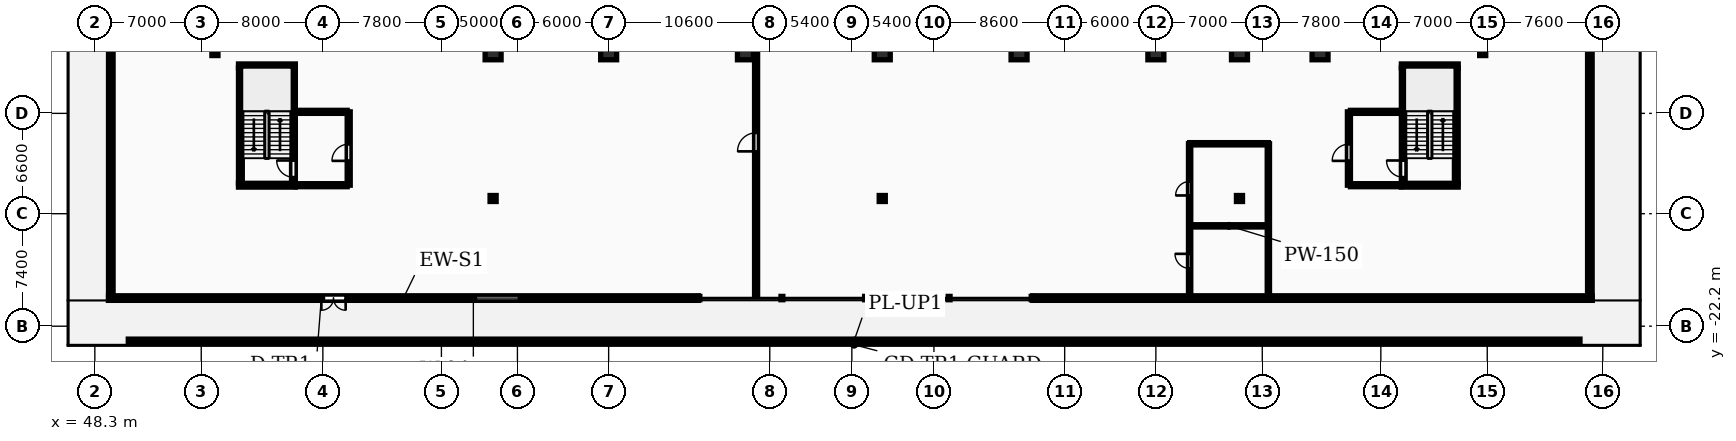
"""IFC4 building model, lengths in metres.
Left out: names, types, materials, properties, quantities, classifications, styles, units other than length and angle.
Written with IfcOpenShell. Run it as: python <this file> out.ifc"""

import sys

from ifc_helpers import new_model, si_unit, direction, frame, frame_2d, origin, origin_2d, place, context, subcontext, project, spatial, rectangle, i_section, extrude, element, fill, save


model = new_model("IFC4")
c1 = context("Model", 3, precision=1e-05, world=origin(), true_north=direction((0.0, 1.0)))
c2 = subcontext(c1, "Body", "Model", "MODEL_VIEW")
j1 = project(units=[si_unit("LENGTHUNIT", "METRE"), si_unit("PLANEANGLEUNIT", "RADIAN")], contexts=[c1])
p1 = place(None, origin())
s1 = spatial("IfcSite", under=j1, at=p1, CompositionType="ELEMENT")
p2 = place(p1, origin())
s2 = spatial("IfcBuilding", under=s1, at=p2, CompositionType="ELEMENT")
p3 = place(p2, frame((0.0, 0.0, 10.0)))
s3 = spatial("IfcBuildingStorey", under=s2, at=p3, CompositionType="ELEMENT", Elevation=10.0)
for number, where, z_axis, x_axis in (
    (1, (74.5, -4.2, 0.0), (0.0, 0.0, 1.0), (1.0, 0.0, 0.0)),
    (2, (82.1, -4.2, 0.0), (0.0, 0.0, 1.0), (1.0, 0.0, 0.0)),
    (3, (91.1, -4.2, 0.0), (0.0, 0.0, 1.0), (1.0, 0.0, 0.0)),
    (4, (100.1, -4.2, 0.0), (0.0, 0.0, 1.0), (1.0, 0.0, 0.0)),
    (5, (109.1, -4.2, 0.0), (0.0, 0.0, 1.0), (1.0, 0.0, 0.0)),
    (6, (118.1, -4.2, 0.0), (0.0, 0.0, 1.0), (1.0, 0.0, 0.0)),
    (7, (123.6, -4.2, 0.0), (0.0, 0.0, 1.0), (1.0, 0.0, 0.0)),
    (8, (128.9, -4.2, 0.0), (0.0, 0.0, 1.0), (1.0, 0.0, 0.0)),
):
    element("IfcColumn", number, at=place(p3, frame(where, z_axis=z_axis, x_axis=x_axis)), inside=s3, PredefinedType="COLUMN", context=c2, shape_type="SweptSolid", body=[
        extrude(rectangle(XDim=1.05, YDim=0.95, at=origin_2d()), origin(), (0.0, 0.0, 1.0), 4.5),
    ])
for number, where, z_axis, x_axis in (
    (9, (56.2, -4.2, 0.0), (0.0, 0.0, 1.0), (1.0, 0.0, 0.0)),
    (10, (139.6, -4.2, 0.0), (0.0, 0.0, 1.0), (1.0, 0.0, 0.0)),
    (11, (74.5, -13.8, 0.0), (0.0, 0.0, 1.0), (1.0, 0.0, 0.0)),
    (12, (100.1, -13.8, 0.0), (0.0, 0.0, 1.0), (1.0, 0.0, 0.0)),
    (13, (123.6, -13.8, 0.0), (0.0, 0.0, 1.0), (1.0, 0.0, 0.0)),
):
    element("IfcColumn", number, at=place(p3, frame(where, z_axis=z_axis, x_axis=x_axis)), inside=s3, PredefinedType="COLUMN", context=c2, shape_type="SweptSolid", body=[
        extrude(i_section(OverallWidth=0.399, OverallDepth=0.394, WebThickness=0.023, FlangeThickness=0.037, FilletRadius=0.015, at=origin_2d()), origin(), (0.0, 0.0, 1.0), 4.5),
    ])
p4 = place(p3, frame((49.2, -20.35, 0.0), z_axis=(0.0, 0.0, 1.0), x_axis=(1.0, 0.0, 0.0)))
e14 = element("IfcWall", 14, at=p4, inside=s3, PredefinedType="STANDARD", context=c2, shape_type="SweptSolid", body=[
    extrude(rectangle(XDim=38.8, YDim=0.3, at=frame_2d((19.4, 0.0))), origin(), (0.0, 0.0, 1.0), 4.2),
])
p5 = place(p4, frame((14.0, 0.0, 0.0)))
e15 = element("IfcOpeningElement", 15, at=p5, cuts=e14, PredefinedType="OPENING", context=c2, shape_type="SweptSolid", body=[
    extrude(rectangle(XDim=1.6, YDim=2.2, at=frame_2d((0.8, 1.1))), frame((0.0, 0.16, 0.0), z_axis=(0.0, -1.0, 0.0), x_axis=(1.0, 0.0, 0.0)), (0.0, 0.0, 1.0), 0.32),
])
p6 = place(p4, frame((24.0, 0.0, 0.9)))
e16 = element("IfcOpeningElement", 16, at=p6, cuts=e14, PredefinedType="OPENING", context=c2, shape_type="SweptSolid", body=[
    extrude(rectangle(XDim=3.0, YDim=2.6, at=frame_2d((1.5, 1.3))), frame((0.0, 0.16, 0.0), z_axis=(0.0, -1.0, 0.0), x_axis=(1.0, 0.0, 0.0)), (0.0, 0.0, 1.0), 0.32),
])
p7 = place(p3, frame((110.0, -20.35, 0.0), z_axis=(0.0, 0.0, 1.0), x_axis=(1.0, 0.0, 0.0)))
e17 = element("IfcWall", 17, at=p7, inside=s3, PredefinedType="STANDARD", context=c2, shape_type="SweptSolid", body=[
    extrude(rectangle(XDim=36.8, YDim=0.3, at=frame_2d((18.4, 0.0))), origin(), (0.0, 0.0, 1.0), 4.2),
])
p8 = place(p3, frame((49.35, 104.2, 0.0), z_axis=(0.0, 0.0, 1.0), x_axis=(0.0, -1.0, 0.0)))
e18 = element("IfcWall", 18, at=p8, inside=s3, PredefinedType="STANDARD", context=c2, shape_type="SweptSolid", body=[
    extrude(rectangle(XDim=124.7, YDim=0.3, at=frame_2d((62.35, 0.0))), origin(), (0.0, 0.0, 1.0), 4.2),
])
p9 = place(p8, frame((12.0, 0.0, 0.0)))
e19 = element("IfcOpeningElement", 19, at=p9, cuts=e18, PredefinedType="OPENING", context=c2, shape_type="SweptSolid", body=[
    extrude(rectangle(XDim=1.6, YDim=2.2, at=frame_2d((0.8, 1.1))), frame((0.0, 0.16, 0.0), z_axis=(0.0, -1.0, 0.0), x_axis=(1.0, 0.0, 0.0)), (0.0, 0.0, 1.0), 0.32),
])
p10 = place(p3, frame((146.65, -20.5, 0.0), z_axis=(0.0, 0.0, 1.0), x_axis=(0.0, 1.0, 0.0)))
e20 = element("IfcWall", 20, at=p10, inside=s3, PredefinedType="STANDARD", context=c2, shape_type="SweptSolid", body=[
    extrude(rectangle(XDim=124.7, YDim=0.3, at=frame_2d((62.35, 0.0))), origin(), (0.0, 0.0, 1.0), 4.2),
])
p11 = place(p10, frame((20.0, 0.0, 0.0)))
e21 = element("IfcOpeningElement", 21, at=p11, cuts=e20, PredefinedType="OPENING", context=c2, shape_type="SweptSolid", body=[
    extrude(rectangle(XDim=1.6, YDim=2.2, at=frame_2d((0.8, 1.1))), frame((0.0, 0.16, 0.0), z_axis=(0.0, -1.0, 0.0), x_axis=(1.0, 0.0, 0.0)), (0.0, 0.0, 1.0), 0.32),
])
p12 = place(p3, frame((50.5, -23.15, 0.0), z_axis=(0.0, 0.0, 1.0), x_axis=(1.0, 0.0, 0.0)))
e22 = element("IfcWall", 22, at=p12, inside=s3, PredefinedType="PARAPET", context=c2, shape_type="SweptSolid", body=[
    extrude(rectangle(XDim=95.5, YDim=0.2, at=frame_2d((47.75, 0.0))), origin(), (0.0, 0.0, 1.0), 0.65),
])
p13 = place(p3, frame((57.875, -12.8, 0.0), z_axis=(0.0, 0.0, 1.0), x_axis=(0.0, 1.0, 0.0)))
e23 = element("IfcWall", 23, at=p13, inside=s3, PredefinedType="SHEAR", context=c2, shape_type="SweptSolid", body=[
    extrude(rectangle(XDim=7.6, YDim=0.25, at=frame_2d((3.8, 0.0))), origin(), (0.0, 0.0, 1.0), 4.5),
])
for number, where, z_axis, x_axis in (
    (24, (57.75, -12.925, 0.0), (0.0, 0.0, 1.0), (1.0, 0.0, 0.0)),
    (25, (57.75, -5.075, 0.0), (0.0, 0.0, 1.0), (1.0, 0.0, 0.0)),
):
    element("IfcWall", number, at=place(p3, frame(where, z_axis=z_axis, x_axis=x_axis)), inside=s3, PredefinedType="SHEAR", context=c2, shape_type="SweptSolid", body=[
        extrude(rectangle(XDim=3.74, YDim=0.25, at=frame_2d((1.87, 0.0))), origin(), (0.0, 0.0, 1.0), 4.5),
    ])
p14 = place(p3, frame((61.365, -12.8, 0.0), z_axis=(0.0, 0.0, 1.0), x_axis=(0.0, 1.0, 0.0)))
e26 = element("IfcWall", 26, at=p14, inside=s3, PredefinedType="SHEAR", context=c2, shape_type="SweptSolid", body=[
    extrude(rectangle(XDim=7.6, YDim=0.25, at=frame_2d((3.8, 0.0))), origin(), (0.0, 0.0, 1.0), 4.5),
])
p15 = place(p14, frame((0.4, 0.0, 0.0)))
e27 = element("IfcOpeningElement", 27, at=p15, cuts=e26, PredefinedType="OPENING", context=c2, shape_type="SweptSolid", body=[
    extrude(rectangle(XDim=1.1, YDim=2.1, at=frame_2d((0.55, 1.05))), frame((0.0, 0.135, 0.0), z_axis=(0.0, -1.0, 0.0), x_axis=(1.0, 0.0, 0.0)), (0.0, 0.0, 1.0), 0.27),
])
p16 = place(p3, frame((65.0, -12.925, 0.0), z_axis=(0.0, 0.0, 1.0), x_axis=(0.0, 1.0, 0.0)))
e28 = element("IfcWall", 28, at=p16, inside=s3, PredefinedType="PARTITIONING", context=c2, shape_type="SweptSolid", body=[
    extrude(rectangle(XDim=4.825, YDim=0.2, at=frame_2d((2.413, 0.0))), origin(), (0.0, 0.0, 1.0), 4.2),
])
p17 = place(p16, frame((1.6, 0.0, 0.0)))
e29 = element("IfcOpeningElement", 29, at=p17, cuts=e28, PredefinedType="OPENING", context=c2, shape_type="SweptSolid", body=[
    extrude(rectangle(XDim=1.1, YDim=2.15, at=frame_2d((0.55, 1.075))), frame((0.0, 0.11, 0.0), z_axis=(0.0, -1.0, 0.0), x_axis=(1.0, 0.0, 0.0)), (0.0, 0.0, 1.0), 0.22),
])
for number, where, z_axis, x_axis in (
    (30, (61.5, -12.925, 0.0), (0.0, 0.0, 1.0), (1.0, 0.0, 0.0)),
    (31, (61.5, -8.1, 0.0), (0.0, 0.0, 1.0), (1.0, 0.0, 0.0)),
):
    element("IfcWall", number, at=place(p3, frame(where, z_axis=z_axis, x_axis=x_axis)), inside=s3, PredefinedType="PARTITIONING", context=c2, shape_type="SweptSolid", body=[
        extrude(rectangle(XDim=3.4, YDim=0.2, at=frame_2d((1.7, 0.0))), origin(), (0.0, 0.0, 1.0), 4.2),
    ])
p18 = place(p3, frame((134.375, -12.8, 0.0), z_axis=(0.0, 0.0, 1.0), x_axis=(0.0, 1.0, 0.0)))
e32 = element("IfcWall", 32, at=p18, inside=s3, PredefinedType="SHEAR", context=c2, shape_type="SweptSolid", body=[
    extrude(rectangle(XDim=7.6, YDim=0.25, at=frame_2d((3.8, 0.0))), origin(), (0.0, 0.0, 1.0), 4.5),
])
p19 = place(p18, frame((0.4, 0.0, 0.0)))
e33 = element("IfcOpeningElement", 33, at=p19, cuts=e32, PredefinedType="OPENING", context=c2, shape_type="SweptSolid", body=[
    extrude(rectangle(XDim=1.1, YDim=2.1, at=frame_2d((0.55, 1.05))), frame((0.0, 0.135, 0.0), z_axis=(0.0, -1.0, 0.0), x_axis=(1.0, 0.0, 0.0)), (0.0, 0.0, 1.0), 0.27),
])
p20 = place(p3, frame((137.865, -12.8, 0.0), z_axis=(0.0, 0.0, 1.0), x_axis=(0.0, 1.0, 0.0)))
e34 = element("IfcWall", 34, at=p20, inside=s3, PredefinedType="SHEAR", context=c2, shape_type="SweptSolid", body=[
    extrude(rectangle(XDim=7.6, YDim=0.25, at=frame_2d((3.8, 0.0))), origin(), (0.0, 0.0, 1.0), 4.5),
])
for number, where, z_axis, x_axis in (
    (35, (134.25, -12.925, 0.0), (0.0, 0.0, 1.0), (1.0, 0.0, 0.0)),
    (36, (134.25, -5.075, 0.0), (0.0, 0.0, 1.0), (1.0, 0.0, 0.0)),
):
    element("IfcWall", number, at=place(p3, frame(where, z_axis=z_axis, x_axis=x_axis)), inside=s3, PredefinedType="SHEAR", context=c2, shape_type="SweptSolid", body=[
        extrude(rectangle(XDim=3.74, YDim=0.25, at=frame_2d((1.87, 0.0))), origin(), (0.0, 0.0, 1.0), 4.5),
    ])
p21 = place(p3, frame((130.8, -12.925, 0.0), z_axis=(0.0, 0.0, 1.0), x_axis=(0.0, 1.0, 0.0)))
e37 = element("IfcWall", 37, at=p21, inside=s3, PredefinedType="PARTITIONING", context=c2, shape_type="SweptSolid", body=[
    extrude(rectangle(XDim=4.825, YDim=0.2, at=frame_2d((2.413, 0.0))), origin(), (0.0, 0.0, 1.0), 4.2),
])
p22 = place(p21, frame((1.6, 0.0, 0.0)))
e38 = element("IfcOpeningElement", 38, at=p22, cuts=e37, PredefinedType="OPENING", context=c2, shape_type="SweptSolid", body=[
    extrude(rectangle(XDim=1.1, YDim=2.15, at=frame_2d((0.55, 1.075))), frame((0.0, 0.11, 0.0), z_axis=(0.0, -1.0, 0.0), x_axis=(1.0, 0.0, 0.0)), (0.0, 0.0, 1.0), 0.22),
])
for number, where, z_axis, x_axis in (
    (39, (130.9, -12.925, 0.0), (0.0, 0.0, 1.0), (1.0, 0.0, 0.0)),
    (40, (130.9, -8.1, 0.0), (0.0, 0.0, 1.0), (1.0, 0.0, 0.0)),
):
    element("IfcWall", number, at=place(p3, frame(where, z_axis=z_axis, x_axis=x_axis)), inside=s3, PredefinedType="PARTITIONING", context=c2, shape_type="SweptSolid", body=[
        extrude(rectangle(XDim=3.35, YDim=0.2, at=frame_2d((1.675, 0.0))), origin(), (0.0, 0.0, 1.0), 4.2),
    ])
p23 = place(p3, frame((91.8, -20.2, 0.0), z_axis=(0.0, 0.0, 1.0), x_axis=(0.0, 1.0, 0.0)))
e41 = element("IfcWall", 41, at=p23, inside=s3, PredefinedType="PARTITIONING", context=c2, shape_type="SweptSolid", body=[
    extrude(rectangle(XDim=38.45, YDim=0.2, at=frame_2d((19.225, 0.0))), origin(), (0.0, 0.0, 1.0), 4.2),
])
p24 = place(p23, frame((9.5, 0.0, 0.0)))
e42 = element("IfcOpeningElement", 42, at=p24, cuts=e41, PredefinedType="OPENING", context=c2, shape_type="SweptSolid", body=[
    extrude(rectangle(XDim=1.22, YDim=2.18, at=frame_2d((0.61, 1.09))), frame((0.0, 0.11, 0.0), z_axis=(0.0, -1.0, 0.0), x_axis=(1.0, 0.0, 0.0)), (0.0, 0.0, 1.0), 0.22),
])
p25 = place(p3, frame((120.32, -20.2, 0.0), z_axis=(0.0, 0.0, 1.0), x_axis=(0.0, 1.0, 0.0)))
e43 = element("IfcWall", 43, at=p25, inside=s3, PredefinedType="PARTITIONING", context=c2, shape_type="SweptSolid", body=[
    extrude(rectangle(XDim=10.0, YDim=0.15, at=frame_2d((5.0, 0.0))), origin(), (0.0, 0.0, 1.0), 4.2),
])
p26 = place(p25, frame((1.8, 0.0, 0.0)))
e44 = element("IfcOpeningElement", 44, at=p26, cuts=e43, PredefinedType="OPENING", context=c2, shape_type="SweptSolid", body=[
    extrude(rectangle(XDim=0.96, YDim=2.1, at=frame_2d((0.48, 1.05))), frame((0.0, 0.085, 0.0), z_axis=(0.0, -1.0, 0.0), x_axis=(1.0, 0.0, 0.0)), (0.0, 0.0, 1.0), 0.17),
])
p27 = place(p25, frame((6.6, 0.0, 0.0)))
e45 = element("IfcOpeningElement", 45, at=p27, cuts=e43, PredefinedType="OPENING", context=c2, shape_type="SweptSolid", body=[
    extrude(rectangle(XDim=0.92, YDim=2.08, at=frame_2d((0.46, 1.04))), frame((0.0, 0.085, 0.0), z_axis=(0.0, -1.0, 0.0), x_axis=(1.0, 0.0, 0.0)), (0.0, 0.0, 1.0), 0.17),
])
for number, where, z_axis, x_axis in (
    (46, (120.32, -15.6, 0.0), (0.0, 0.0, 1.0), (1.0, 0.0, 0.0)),
    (47, (120.32, -10.2, 0.0), (0.0, 0.0, 1.0), (1.0, 0.0, 0.0)),
):
    element("IfcWall", number, at=place(p3, frame(where, z_axis=z_axis, x_axis=x_axis)), inside=s3, PredefinedType="PARTITIONING", context=c2, shape_type="SweptSolid", body=[
        extrude(rectangle(XDim=5.18, YDim=0.15, at=frame_2d((2.59, 0.0))), origin(), (0.0, 0.0, 1.0), 4.2),
    ])
p28 = place(p3, frame((125.5, -20.2, 0.0), z_axis=(0.0, 0.0, 1.0), x_axis=(0.0, 1.0, 0.0)))
e48 = element("IfcWall", 48, at=p28, inside=s3, PredefinedType="PARTITIONING", context=c2, shape_type="SweptSolid", body=[
    extrude(rectangle(XDim=10.0, YDim=0.15, at=frame_2d((5.0, 0.0))), origin(), (0.0, 0.0, 1.0), 4.2),
])
p29 = place(p5, frame((1.6, 0.0, 0.0), z_axis=(0.0, 0.0, 1.0), x_axis=(-1.0, 0.0, 0.0)))
e49 = element("IfcDoor", 49, at=p29, inside=s3, OperationType="DOUBLE_DOOR_SINGLE_SWING", PredefinedType="DOOR", context=c2, shape_type="SweptSolid", body=[
    extrude(rectangle(XDim=1.6, YDim=2.2, at=frame_2d((0.8, 1.1))), frame((0.0, 0.025, 0.0), z_axis=(0.0, -1.0, 0.0), x_axis=(1.0, 0.0, 0.0)), (0.0, 0.0, 1.0), 0.05),
])
fill(e15, e49)
p30 = place(p6, origin())
e50 = element("IfcWindow", 50, at=p30, inside=s3, PartitioningType="TRIPLE_PANEL_VERTICAL", PredefinedType="WINDOW", context=c2, shape_type="SweptSolid", body=[
    extrude(rectangle(XDim=3.0, YDim=2.6, at=frame_2d((1.5, 1.3))), frame((0.0, 0.03, 0.0), z_axis=(0.0, -1.0, 0.0), x_axis=(1.0, 0.0, 0.0)), (0.0, 0.0, 1.0), 0.06),
])
fill(e16, e50)
p31 = place(p15, origin())
e51 = element("IfcDoor", 51, at=p31, inside=s3, OperationType="SINGLE_SWING_RIGHT", PredefinedType="DOOR", context=c2, shape_type="SweptSolid", body=[
    extrude(rectangle(XDim=1.1, YDim=2.1, at=frame_2d((0.55, 1.05))), frame((0.0, 0.025, 0.0), z_axis=(0.0, -1.0, 0.0), x_axis=(1.0, 0.0, 0.0)), (0.0, 0.0, 1.0), 0.05),
])
fill(e27, e51)
p32 = place(p17, origin())
e52 = element("IfcDoor", 52, at=p32, inside=s3, OperationType="SINGLE_SWING_LEFT", PredefinedType="DOOR", context=c2, shape_type="SweptSolid", body=[
    extrude(rectangle(XDim=1.1, YDim=2.15, at=frame_2d((0.55, 1.075))), frame((0.0, 0.025, 0.0), z_axis=(0.0, -1.0, 0.0), x_axis=(1.0, 0.0, 0.0)), (0.0, 0.0, 1.0), 0.05),
])
fill(e29, e52)
p33 = place(p19, origin())
e53 = element("IfcDoor", 53, at=p33, inside=s3, OperationType="SINGLE_SWING_RIGHT", PredefinedType="DOOR", context=c2, shape_type="SweptSolid", body=[
    extrude(rectangle(XDim=1.1, YDim=2.1, at=frame_2d((0.55, 1.05))), frame((0.0, 0.025, 0.0), z_axis=(0.0, -1.0, 0.0), x_axis=(1.0, 0.0, 0.0)), (0.0, 0.0, 1.0), 0.05),
])
fill(e33, e53)
p34 = place(p22, origin())
e54 = element("IfcDoor", 54, at=p34, inside=s3, OperationType="SINGLE_SWING_LEFT", PredefinedType="DOOR", context=c2, shape_type="SweptSolid", body=[
    extrude(rectangle(XDim=1.1, YDim=2.15, at=frame_2d((0.55, 1.075))), frame((0.0, 0.025, 0.0), z_axis=(0.0, -1.0, 0.0), x_axis=(1.0, 0.0, 0.0)), (0.0, 0.0, 1.0), 0.05),
])
fill(e38, e54)
p35 = place(p24, origin())
e55 = element("IfcDoor", 55, at=p35, inside=s3, OperationType="SINGLE_SWING_LEFT", PredefinedType="DOOR", context=c2, shape_type="SweptSolid", body=[
    extrude(rectangle(XDim=1.22, YDim=2.18, at=frame_2d((0.61, 1.09))), frame((0.0, 0.025, 0.0), z_axis=(0.0, -1.0, 0.0), x_axis=(1.0, 0.0, 0.0)), (0.0, 0.0, 1.0), 0.05),
])
fill(e42, e55)
p36 = place(p26, origin())
e56 = element("IfcDoor", 56, at=p36, inside=s3, OperationType="SINGLE_SWING_RIGHT", PredefinedType="DOOR", context=c2, shape_type="SweptSolid", body=[
    extrude(rectangle(XDim=0.96, YDim=2.1, at=frame_2d((0.48, 1.05))), frame((0.0, 0.025, 0.0), z_axis=(0.0, -1.0, 0.0), x_axis=(1.0, 0.0, 0.0)), (0.0, 0.0, 1.0), 0.05),
])
fill(e44, e56)
p37 = place(p27, origin())
e57 = element("IfcDoor", 57, at=p37, inside=s3, OperationType="SINGLE_SWING_LEFT", PredefinedType="DOOR", context=c2, shape_type="SweptSolid", body=[
    extrude(rectangle(XDim=0.92, YDim=2.08, at=frame_2d((0.46, 1.04))), frame((0.0, 0.025, 0.0), z_axis=(0.0, -1.0, 0.0), x_axis=(1.0, 0.0, 0.0)), (0.0, 0.0, 1.0), 0.05),
])
fill(e45, e57)
save(model, sys.argv[1])
